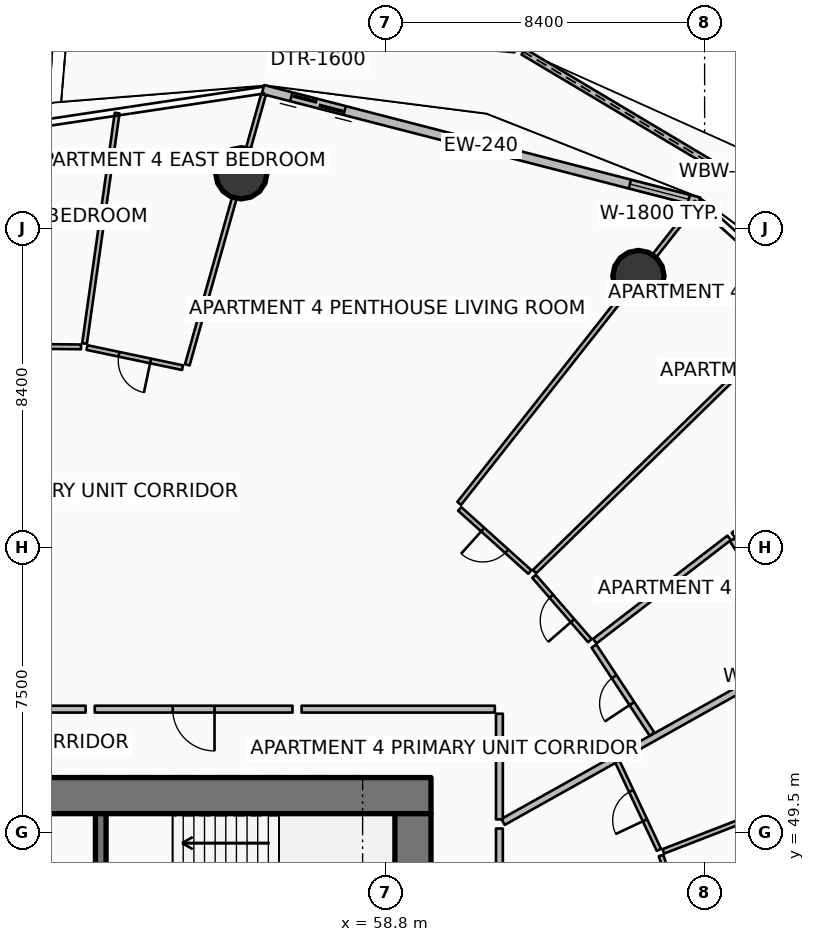
"""IFC4 building model, lengths in metres.
Left out: names, types, materials, properties, quantities, classifications, styles, units other than length and angle.
Written with IfcOpenShell. Run it as: python <this file> out.ifc"""

import sys

from ifc_helpers import new_model, si_unit, direction, frame, frame_2d, origin, origin_2d, place, context, subcontext, project, spatial, polyline, rectangle, circle, outline, extrude, element, fill, save


model = new_model("IFC4")
c1 = context("Model", 3, precision=1e-05, world=origin(), true_north=direction((0.0, 1.0)))
c2 = subcontext(c1, "Body", "Model", "MODEL_VIEW")
j1 = project(units=[si_unit("LENGTHUNIT", "METRE"), si_unit("PLANEANGLEUNIT", "RADIAN")], contexts=[c1])
p1 = place(None, origin())
s1 = spatial("IfcSite", under=j1, at=p1, CompositionType="ELEMENT")
p2 = place(p1, origin())
s2 = spatial("IfcBuilding", under=s1, at=p2, CompositionType="ELEMENT")
p3 = place(p2, frame((0.0, 0.0, 60.15)))
s3 = spatial("IfcBuildingStorey", under=s2, at=p3, CompositionType="ELEMENT", Elevation=60.15)
p4 = place(p3, frame((49.95, 50.475, 0.0), z_axis=(0.0, 0.0, 1.0), x_axis=(1.0, 0.0, 0.0)))
e1 = element("IfcWall", 1, at=p4, inside=s3, PredefinedType="SHEAR", context=c2, shape_type="SweptSolid", body=[
    extrude(rectangle(XDim=10.05, YDim=0.95, at=frame_2d((5.025, 0.0))), origin(), (0.0, 0.0, 1.0), 3.75),
])
p5 = place(p3, frame((59.525, 34.0, 0.0), z_axis=(0.0, 0.0, 1.0), x_axis=(0.0, 1.0, 0.0)))
e2 = element("IfcWall", 2, at=p5, inside=s3, PredefinedType="SHEAR", context=c2, shape_type="SweptSolid", body=[
    extrude(rectangle(XDim=16.0, YDim=0.95, at=frame_2d((8.0, 0.0))), origin(), (0.0, 0.0, 1.0), 3.75),
])
p6 = place(p3, frame((51.31, 46.5, 0.0), z_axis=(0.0, 0.0, 1.0), x_axis=(0.0, 1.0, 0.0)))
e3 = element("IfcWall", 3, at=p6, inside=s3, PredefinedType="SHEAR", context=c2, shape_type="SweptSolid", body=[
    extrude(rectangle(XDim=3.5, YDim=0.28, at=frame_2d((1.75, 0.0))), origin(), (0.0, 0.0, 1.0), 3.75),
])
for number, where, z_axis, x_axis in (
    (4, (65.458, 64.146, 0.0), (0.0, 0.0, 1.0), (1.0, 0.0, 0.0)),
    (5, (55.008, 66.849, 0.0), (0.0, 0.0, 1.0), (1.0, 0.0, 0.0)),
):
    element("IfcColumn", number, at=place(p3, frame(where, z_axis=z_axis, x_axis=x_axis)), inside=s3, PredefinedType="COLUMN", context=c2, shape_type="SweptSolid", body=[
        extrude(circle(Radius=0.675, at=origin_2d()), origin(), (0.0, 0.0, 1.0), 3.5),
    ])
p7 = place(p3, frame((73.087, 63.693, 0.0), z_axis=(0.0, 0.0, 1.0), x_axis=(-0.858860948387, 0.512208816144, 0.0)))
e6 = element("IfcWall", 6, at=p7, inside=s3, PredefinedType="PARAPET", context=c2, shape_type="SweptSolid", body=[
    extrude(outline(polyline([(0.0, 0.0), (12.412, 0.0), (12.412, 1.348), (6.206, 1.182), (0.0, 1.12), (0.0, 0.0)])), frame((0.0, 0.09, 0.0), z_axis=(0.0, -1.0, 0.0), x_axis=(1.0, 0.0, 0.0)), (0.0, 0.0, 1.0), 0.18),
])
p8 = place(p3, frame((62.204, 70.123, 0.0), z_axis=(0.0, 0.0, 1.0), x_axis=(-0.99586852892, 0.09080678998, 0.0)))
e7 = element("IfcWall", 7, at=p8, inside=s3, PredefinedType="PARAPET", context=c2, shape_type="SweptSolid", body=[
    extrude(outline(polyline([(0.0, 0.0), (11.776, 0.0), (11.776, 1.747), (5.888, 1.562), (0.0, 1.348), (0.0, 0.0)])), frame((0.0, 0.09, 0.0), z_axis=(0.0, -1.0, 0.0), x_axis=(1.0, 0.0, 0.0)), (0.0, 0.0, 1.0), 0.18),
])
p9 = place(p3, frame((50.115, 71.153, 0.0), z_axis=(0.0, 0.0, 1.0), x_axis=(-0.972165741218, -0.234294198824, 0.0)))
e8 = element("IfcWall", 8, at=p9, inside=s3, PredefinedType="PARAPET", context=c2, shape_type="SweptSolid", body=[
    extrude(outline(polyline([(0.0, 0.0), (10.934, 0.0), (10.934, 1.832), (5.467, 1.853), (0.0, 1.756), (0.0, 0.0)])), frame((0.0, 0.09, 0.0), z_axis=(0.0, -1.0, 0.0), x_axis=(1.0, 0.0, 0.0)), (0.0, 0.0, 1.0), 0.18),
])
p10 = place(p3, frame((67.054, 66.096, 0.0), z_axis=(0.0, 0.0, 1.0), x_axis=(-0.96833871487, 0.249640007378, 0.0)))
e9 = element("IfcWall", 9, at=p10, inside=s3, PredefinedType="SOLIDWALL", context=c2, shape_type="SweptSolid", body=[
    extrude(rectangle(XDim=11.851, YDim=0.24, at=frame_2d((5.926, 0.0))), origin(), (0.0, 0.0, 1.0), 2.45),
])
p11 = place(p10, frame((9.631, 0.0, 0.0)))
e10 = element("IfcOpeningElement", 10, at=p11, cuts=e9, PredefinedType="OPENING", context=c2, shape_type="SweptSolid", body=[
    extrude(rectangle(XDim=1.45, YDim=2.15, at=frame_2d((0.725, 1.075))), frame((0.0, 0.13, 0.0), z_axis=(0.0, -1.0, 0.0), x_axis=(1.0, 0.0, 0.0)), (0.0, 0.0, 1.0), 0.26),
])
p12 = place(p10, frame((0.28, 0.0, 0.65)))
e11 = element("IfcOpeningElement", 11, at=p12, cuts=e9, PredefinedType="OPENING", context=c2, shape_type="SweptSolid", body=[
    extrude(rectangle(XDim=1.6, YDim=1.5, at=frame_2d((0.8, 0.75))), frame((0.0, 0.13, 0.0), z_axis=(0.0, -1.0, 0.0), x_axis=(1.0, 0.0, 0.0)), (0.0, 0.0, 1.0), 0.26),
])
p13 = place(p3, frame((61.896, 49.782, 0.0), z_axis=(0.0, 0.0, 1.0), x_axis=(0.872493215695, 0.488626225828, 0.0)))
e12 = element("IfcWall", 12, at=p13, inside=s3, PredefinedType="PARTITIONING", context=c2, shape_type="SweptSolid", body=[
    extrude(rectangle(XDim=15.612, YDim=0.18, at=frame_2d((7.806, 0.0))), origin(), (0.0, 0.0, 1.0), 2.867),
])
p14 = place(p3, frame((61.8, 43.753, 0.0), z_axis=(0.0, 0.0, 1.0), x_axis=(0.0, 1.0, 0.0)))
e13 = element("IfcWall", 13, at=p14, inside=s3, PredefinedType="PARTITIONING", context=c2, shape_type="SweptSolid", body=[
    extrude(rectangle(XDim=5.855, YDim=0.18, at=frame_2d((2.927, 0.0))), origin(), (0.0, 0.0, 1.0), 2.867),
])
p15 = place(p3, frame((66.886, 46.534, 0.0), z_axis=(0.0, 0.0, 1.0), x_axis=(0.972368393799, 0.233451722507, 0.0)))
e14 = element("IfcWall", 14, at=p15, inside=s3, PredefinedType="PARTITIONING", context=c2, shape_type="SweptSolid", body=[
    extrude(rectangle(XDim=11.605, YDim=0.125, at=frame_2d((5.802, 0.0))), origin(), (0.0, 0.0, 1.0), 2.94),
])
p16 = place(p3, frame((66.115, 49.008, 0.0), z_axis=(0.0, 0.0, 1.0), x_axis=(0.932641955578, 0.360803246514, 0.0)))
e15 = element("IfcWall", 15, at=p16, inside=s3, PredefinedType="PARTITIONING", context=c2, shape_type="SweptSolid", body=[
    extrude(rectangle(XDim=11.556, YDim=0.125, at=frame_2d((5.778, 0.0))), origin(), (0.0, 0.0, 1.0), 2.94),
])
p17 = place(p3, frame((66.775, 46.59, 0.0), z_axis=(0.0, 0.0, 1.0), x_axis=(-0.297792299564, 0.954630685826, 0.0)))
e16 = element("IfcWall", 16, at=p17, inside=s3, PredefinedType="PARTITIONING", context=c2, shape_type="SweptSolid", body=[
    extrude(rectangle(XDim=2.419, YDim=0.125, at=frame_2d((1.21, 0.0))), origin(), (0.0, 0.0, 1.0), 2.94),
])
p18 = place(p17, frame((0.785, 0.0, 0.0)))
e17 = element("IfcOpeningElement", 17, at=p18, cuts=e16, PredefinedType="OPENING", context=c2, shape_type="SweptSolid", body=[
    extrude(rectangle(XDim=0.85, YDim=2.06, at=frame_2d((0.425, 1.03))), frame((0.0, 0.073, 0.0), z_axis=(0.0, -1.0, 0.0), x_axis=(1.0, 0.0, 0.0)), (0.0, 0.0, 1.0), 0.145),
])
p19 = place(p3, frame((65.997, 49.048, 0.0), z_axis=(0.0, 0.0, 1.0), x_axis=(-0.425774166793, 0.904829463983, 0.0)))
e18 = element("IfcWall", 18, at=p19, inside=s3, PredefinedType="PARTITIONING", context=c2, shape_type="SweptSolid", body=[
    extrude(rectangle(XDim=2.571, YDim=0.125, at=frame_2d((1.285, 0.0))), origin(), (0.0, 0.0, 1.0), 2.867),
])
p20 = place(p19, frame((0.86, 0.0, 0.0)))
e19 = element("IfcOpeningElement", 19, at=p20, cuts=e18, PredefinedType="OPENING", context=c2, shape_type="SweptSolid", body=[
    extrude(rectangle(XDim=0.85, YDim=2.06, at=frame_2d((0.425, 1.03))), frame((0.0, 0.073, 0.0), z_axis=(0.0, -1.0, 0.0), x_axis=(1.0, 0.0, 0.0)), (0.0, 0.0, 1.0), 0.145),
])
p21 = place(p3, frame((56.354, 52.75, 0.0), z_axis=(0.0, 0.0, 1.0), x_axis=(-1.0, 0.0, 0.0)))
e20 = element("IfcWall", 20, at=p21, inside=s3, PredefinedType="PARTITIONING", context=c2, shape_type="SweptSolid", body=[
    extrude(rectangle(XDim=5.203, YDim=0.18, at=frame_2d((2.601, 0.0))), origin(), (0.0, 0.0, 1.0), 2.867),
])
p22 = place(p21, frame((2.052, 0.0, 0.0)))
e21 = element("IfcOpeningElement", 21, at=p22, cuts=e20, PredefinedType="OPENING", context=c2, shape_type="SweptSolid", body=[
    extrude(rectangle(XDim=1.1, YDim=2.1, at=frame_2d((0.55, 1.05))), frame((0.0, 0.1, 0.0), z_axis=(0.0, -1.0, 0.0), x_axis=(1.0, 0.0, 0.0)), (0.0, 0.0, 1.0), 0.2),
])
p23 = place(p3, frame((61.8, 49.848, 0.0), z_axis=(0.0, 0.0, 1.0), x_axis=(0.0, 1.0, 0.0)))
e22 = element("IfcWall", 22, at=p23, inside=s3, PredefinedType="PARTITIONING", context=c2, shape_type="SweptSolid", body=[
    extrude(rectangle(XDim=2.781, YDim=0.18, at=frame_2d((1.391, 0.0))), origin(), (0.0, 0.0, 1.0), 2.867),
])
p24 = place(p3, frame((61.68, 52.75, 0.0), z_axis=(0.0, 0.0, 1.0), x_axis=(-1.0, 0.0, 0.0)))
e23 = element("IfcWall", 23, at=p24, inside=s3, PredefinedType="PARTITIONING", context=c2, shape_type="SweptSolid", body=[
    extrude(rectangle(XDim=5.085, YDim=0.18, at=frame_2d((2.543, 0.0))), origin(), (0.0, 0.0, 1.0), 2.867),
])
p25 = place(p3, frame((60.743, 58.164, 0.0), z_axis=(0.0, 0.0, 1.0), x_axis=(0.61907620874, 0.785330916093, 0.0)))
e24 = element("IfcWall", 24, at=p25, inside=s3, PredefinedType="PARTITIONING", context=c2, shape_type="SweptSolid", body=[
    extrude(rectangle(XDim=10.091, YDim=0.125, at=frame_2d((5.046, 0.0))), origin(), (0.0, 0.0, 1.0), 2.867),
])
p26 = place(p3, frame((65.816, 52.092, 0.0), z_axis=(0.0, 0.0, 1.0), x_axis=(-0.550532146696, 0.834813964578, 0.0)))
e25 = element("IfcWall", 25, at=p26, inside=s3, PredefinedType="PARTITIONING", context=c2, shape_type="SweptSolid", body=[
    extrude(rectangle(XDim=2.776, YDim=0.15, at=frame_2d((1.388, 0.0))), origin(), (0.0, 0.0, 1.0), 2.867),
])
p27 = place(p26, frame((0.963, 0.0, 0.0)))
e26 = element("IfcOpeningElement", 26, at=p27, cuts=e25, PredefinedType="OPENING", context=c2, shape_type="SweptSolid", body=[
    extrude(rectangle(XDim=0.85, YDim=2.06, at=frame_2d((0.425, 1.03))), frame((0.0, 0.085, 0.0), z_axis=(0.0, -1.0, 0.0), x_axis=(1.0, 0.0, 0.0)), (0.0, 0.0, 1.0), 0.17),
])
p28 = place(p3, frame((69.821, 54.335, 0.0), z_axis=(0.0, 0.0, 1.0), x_axis=(-0.550516877558, 0.834824033868, 0.0)))
e27 = element("IfcWall", 27, at=p28, inside=s3, PredefinedType="PARTITIONING", context=c2, shape_type="SweptSolid", body=[
    extrude(rectangle(XDim=3.44, YDim=0.15, at=frame_2d((1.72, 0.0))), origin(), (0.0, 0.0, 1.0), 2.867),
])
p29 = place(p3, frame((64.31, 54.539, 0.0), z_axis=(0.0, 0.0, 1.0), x_axis=(0.792803030826, 0.609477935871, 0.0)))
e28 = element("IfcWall", 28, at=p29, inside=s3, PredefinedType="PARTITIONING", context=c2, shape_type="SweptSolid", body=[
    extrude(rectangle(XDim=4.46, YDim=0.15, at=frame_2d((2.23, 0.0))), origin(), (0.0, 0.0, 1.0), 2.94),
])
p30 = place(p3, frame((67.949, 57.337, 0.0), z_axis=(0.0, 0.0, 1.0), x_axis=(0.792800135679, 0.609481701832, 0.0)))
e29 = element("IfcWall", 29, at=p30, inside=s3, PredefinedType="PARTITIONING", context=c2, shape_type="SweptSolid", body=[
    extrude(rectangle(XDim=5.976, YDim=0.125, at=frame_2d((2.988, 0.0))), origin(), (0.0, 0.0, 1.0), 2.94),
])
p31 = place(p30, frame((2.563, 0.0, 0.0)))
e30 = element("IfcOpeningElement", 30, at=p31, cuts=e29, PredefinedType="OPENING", context=c2, shape_type="SweptSolid", body=[
    extrude(rectangle(XDim=0.85, YDim=2.06, at=frame_2d((0.425, 1.03))), frame((0.0, 0.073, 0.0), z_axis=(0.0, -1.0, 0.0), x_axis=(1.0, 0.0, 0.0)), (0.0, 0.0, 1.0), 0.145),
])
p32 = place(p3, frame((62.725, 56.368, 0.0), z_axis=(0.0, 0.0, 1.0), x_axis=(0.715749552764, 0.698357056038, 0.0)))
e31 = element("IfcWall", 31, at=p32, inside=s3, PredefinedType="PARTITIONING", context=c2, shape_type="SweptSolid", body=[
    extrude(rectangle(XDim=10.107, YDim=0.125, at=frame_2d((5.053, 0.0))), origin(), (0.0, 0.0, 1.0), 2.94),
])
p33 = place(p3, frame((64.18, 54.552, 0.0), z_axis=(0.0, 0.0, 1.0), x_axis=(-0.654947139149, 0.75567469517, 0.0)))
e32 = element("IfcWall", 32, at=p33, inside=s3, PredefinedType="PARTITIONING", context=c2, shape_type="SweptSolid", body=[
    extrude(rectangle(XDim=2.24, YDim=0.125, at=frame_2d((1.12, 0.0))), origin(), (0.0, 0.0, 1.0), 2.94),
])
p34 = place(p33, frame((0.695, 0.0, 0.0)))
e33 = element("IfcOpeningElement", 33, at=p34, cuts=e32, PredefinedType="OPENING", context=c2, shape_type="SweptSolid", body=[
    extrude(rectangle(XDim=0.85, YDim=2.06, at=frame_2d((0.425, 1.03))), frame((0.0, 0.073, 0.0), z_axis=(0.0, -1.0, 0.0), x_axis=(1.0, 0.0, 0.0)), (0.0, 0.0, 1.0), 0.145),
])
p35 = place(p3, frame((62.601, 56.358, 0.0), z_axis=(0.0, 0.0, 1.0), x_axis=(-0.743435913228, 0.66880717918, 0.0)))
e34 = element("IfcWall", 34, at=p35, inside=s3, PredefinedType="PARTITIONING", context=c2, shape_type="SweptSolid", body=[
    extrude(rectangle(XDim=2.483, YDim=0.125, at=frame_2d((1.241, 0.0))), origin(), (0.0, 0.0, 1.0), 2.867),
])
p36 = place(p35, frame((0.816, 0.0, 0.0)))
e35 = element("IfcOpeningElement", 35, at=p36, cuts=e34, PredefinedType="OPENING", context=c2, shape_type="SweptSolid", body=[
    extrude(rectangle(XDim=0.85, YDim=2.06, at=frame_2d((0.425, 1.03))), frame((0.0, 0.073, 0.0), z_axis=(0.0, -1.0, 0.0), x_axis=(1.0, 0.0, 0.0)), (0.0, 0.0, 1.0), 0.145),
])
p37 = place(p3, frame((50.912, 52.75, 0.0), z_axis=(0.0, 0.0, 1.0), x_axis=(-1.0, 0.0, 0.0)))
e36 = element("IfcWall", 36, at=p37, inside=s3, PredefinedType="PARTITIONING", context=c2, shape_type="SweptSolid", body=[
    extrude(rectangle(XDim=4.064, YDim=0.18, at=frame_2d((2.032, 0.0))), origin(), (0.0, 0.0, 1.0), 2.867),
])
p38 = place(p3, frame((53.587, 61.81, 0.0), z_axis=(0.0, 0.0, 1.0), x_axis=(0.271464088879, 0.962448569249, 0.0)))
e37 = element("IfcWall", 37, at=p38, inside=s3, PredefinedType="PARTITIONING", context=c2, shape_type="SweptSolid", body=[
    extrude(rectangle(XDim=7.389, YDim=0.125, at=frame_2d((3.695, 0.0))), origin(), (0.0, 0.0, 1.0), 2.867),
])
p39 = place(p3, frame((50.883, 62.37, 0.0), z_axis=(0.0, 0.0, 1.0), x_axis=(0.140126411414, 0.990133621702, 0.0)))
e38 = element("IfcWall", 38, at=p39, inside=s3, PredefinedType="PARTITIONING", context=c2, shape_type="SweptSolid", body=[
    extrude(rectangle(XDim=6.124, YDim=0.125, at=frame_2d((3.062, 0.0))), origin(), (0.0, 0.0, 1.0), 2.94),
])
p40 = place(p3, frame((53.462, 61.735, 0.0), z_axis=(0.0, 0.0, 1.0), x_axis=(-0.978499333356, 0.206249980902, 0.0)))
e39 = element("IfcWall", 39, at=p40, inside=s3, PredefinedType="PARTITIONING", context=c2, shape_type="SweptSolid", body=[
    extrude(rectangle(XDim=2.569, YDim=0.125, at=frame_2d((1.284, 0.0))), origin(), (0.0, 0.0, 1.0), 2.867),
])
p41 = place(p40, frame((0.859, 0.0, 0.0)))
e40 = element("IfcOpeningElement", 40, at=p41, cuts=e39, PredefinedType="OPENING", context=c2, shape_type="SweptSolid", body=[
    extrude(rectangle(XDim=0.85, YDim=2.06, at=frame_2d((0.425, 1.03))), frame((0.0, 0.073, 0.0), z_axis=(0.0, -1.0, 0.0), x_axis=(1.0, 0.0, 0.0)), (0.0, 0.0, 1.0), 0.145),
])
p42 = place(p3, frame((50.79, 62.282, 0.0), z_axis=(0.0, 0.0, 1.0), x_axis=(-0.99993505002, 0.011397181261, 0.0)))
e41 = element("IfcWall", 41, at=p42, inside=s3, PredefinedType="PARTITIONING", context=c2, shape_type="SweptSolid", body=[
    extrude(rectangle(XDim=5.098, YDim=0.125, at=frame_2d((2.549, 0.0))), origin(), (0.0, 0.0, 1.0), 2.867),
])
p43 = place(p42, frame((2.099, 0.0, 0.0)))
e42 = element("IfcOpeningElement", 42, at=p43, cuts=e41, PredefinedType="OPENING", context=c2, shape_type="SweptSolid", body=[
    extrude(rectangle(XDim=0.9, YDim=2.08, at=frame_2d((0.45, 1.04))), frame((0.0, 0.073, 0.0), z_axis=(0.0, -1.0, 0.0), x_axis=(1.0, 0.0, 0.0)), (0.0, 0.0, 1.0), 0.145),
])
p44 = place(p11, origin())
e43 = element("IfcDoor", 43, at=p44, inside=s3, OperationType="DOUBLE_DOOR_SLIDING", PredefinedType="DOOR", context=c2, shape_type="SweptSolid", body=[
    extrude(rectangle(XDim=1.45, YDim=2.15, at=frame_2d((0.725, 1.075))), frame((0.0, 0.025, 0.0), z_axis=(0.0, -1.0, 0.0), x_axis=(1.0, 0.0, 0.0)), (0.0, 0.0, 1.0), 0.05),
])
fill(e10, e43)
p45 = place(p12, origin())
e44 = element("IfcWindow", 44, at=p45, inside=s3, PartitioningType="SINGLE_PANEL", PredefinedType="WINDOW", context=c2, shape_type="SweptSolid", body=[
    extrude(rectangle(XDim=1.6, YDim=1.5, at=frame_2d((0.8, 0.75))), frame((0.0, 0.03, 0.0), z_axis=(0.0, -1.0, 0.0), x_axis=(1.0, 0.0, 0.0)), (0.0, 0.0, 1.0), 0.06),
])
fill(e11, e44)
p46 = place(p20, origin())
e45 = element("IfcDoor", 45, at=p46, inside=s3, OperationType="SINGLE_SWING_LEFT", PredefinedType="DOOR", context=c2, shape_type="SweptSolid", body=[
    extrude(rectangle(XDim=0.85, YDim=2.06, at=frame_2d((0.425, 1.03))), frame((0.0, 0.025, 0.0), z_axis=(0.0, -1.0, 0.0), x_axis=(1.0, 0.0, 0.0)), (0.0, 0.0, 1.0), 0.05),
])
fill(e19, e45)
p47 = place(p22, origin())
e46 = element("IfcDoor", 46, at=p47, inside=s3, OperationType="SINGLE_SWING_LEFT", PredefinedType="DOOR", context=c2, shape_type="SweptSolid", body=[
    extrude(rectangle(XDim=1.1, YDim=2.1, at=frame_2d((0.55, 1.05))), frame((0.0, 0.025, 0.0), z_axis=(0.0, -1.0, 0.0), x_axis=(1.0, 0.0, 0.0)), (0.0, 0.0, 1.0), 0.05),
])
fill(e21, e46)
p48 = place(p27, origin())
e47 = element("IfcDoor", 47, at=p48, inside=s3, OperationType="SINGLE_SWING_LEFT", PredefinedType="DOOR", context=c2, shape_type="SweptSolid", body=[
    extrude(rectangle(XDim=0.85, YDim=2.06, at=frame_2d((0.425, 1.03))), frame((0.0, 0.025, 0.0), z_axis=(0.0, -1.0, 0.0), x_axis=(1.0, 0.0, 0.0)), (0.0, 0.0, 1.0), 0.05),
])
fill(e26, e47)
p49 = place(p34, origin())
e48 = element("IfcDoor", 48, at=p49, inside=s3, OperationType="SINGLE_SWING_LEFT", PredefinedType="DOOR", context=c2, shape_type="SweptSolid", body=[
    extrude(rectangle(XDim=0.85, YDim=2.06, at=frame_2d((0.425, 1.03))), frame((0.0, 0.025, 0.0), z_axis=(0.0, -1.0, 0.0), x_axis=(1.0, 0.0, 0.0)), (0.0, 0.0, 1.0), 0.05),
])
fill(e33, e48)
p50 = place(p36, origin())
e49 = element("IfcDoor", 49, at=p50, inside=s3, OperationType="SINGLE_SWING_RIGHT", PredefinedType="DOOR", context=c2, shape_type="SweptSolid", body=[
    extrude(rectangle(XDim=0.85, YDim=2.06, at=frame_2d((0.425, 1.03))), frame((0.0, 0.025, 0.0), z_axis=(0.0, -1.0, 0.0), x_axis=(1.0, 0.0, 0.0)), (0.0, 0.0, 1.0), 0.05),
])
fill(e35, e49)
p51 = place(p41, origin())
e50 = element("IfcDoor", 50, at=p51, inside=s3, OperationType="SINGLE_SWING_LEFT", PredefinedType="DOOR", context=c2, shape_type="SweptSolid", body=[
    extrude(rectangle(XDim=0.85, YDim=2.06, at=frame_2d((0.425, 1.03))), frame((0.0, 0.025, 0.0), z_axis=(0.0, -1.0, 0.0), x_axis=(1.0, 0.0, 0.0)), (0.0, 0.0, 1.0), 0.05),
])
fill(e40, e50)
save(model, sys.argv[1])
